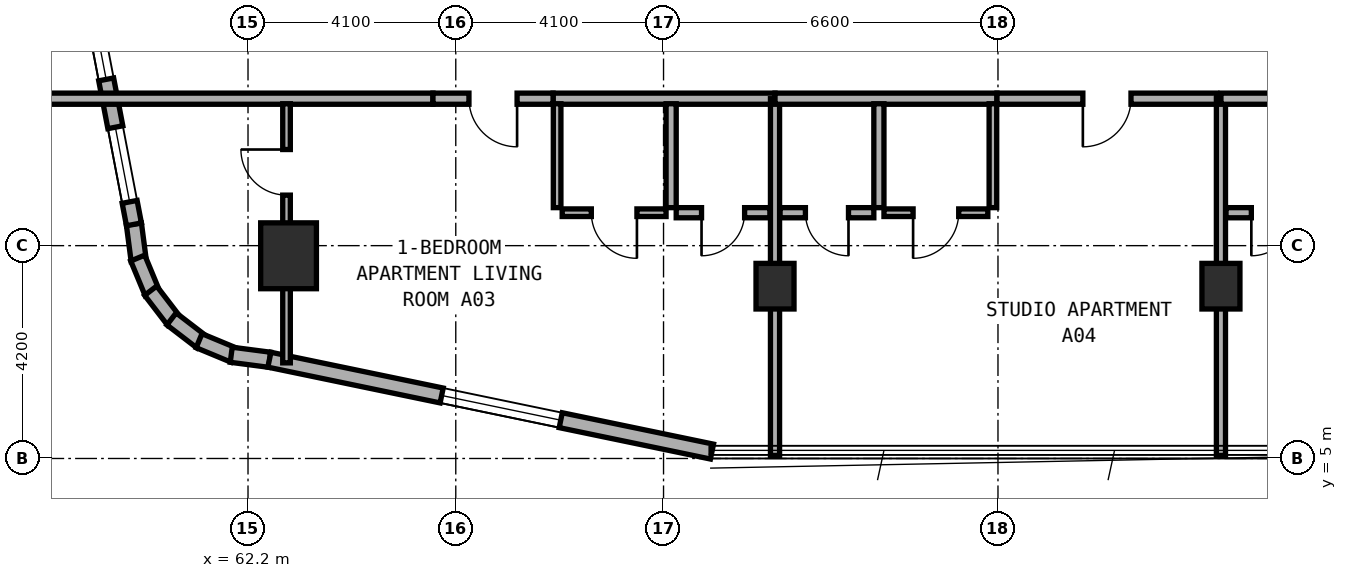
"""IFC4 building model, lengths in metres.
Left out: names, types, materials, properties, quantities, classifications, styles, units other than length and angle.
Written with IfcOpenShell. Run it as: python <this file> out.ifc"""

import sys

from ifc_helpers import new_model, si_unit, direction, frame, frame_2d, origin, origin_2d, place, context, subcontext, project, spatial, rectangle, extrude, element, fill, save


model = new_model("IFC4")
c1 = context("Model", 3, precision=1e-05, world=origin(), true_north=direction((0.0, 1.0)))
c2 = subcontext(c1, "Body", "Model", "MODEL_VIEW")
j1 = project(units=[si_unit("LENGTHUNIT", "METRE"), si_unit("PLANEANGLEUNIT", "RADIAN")], contexts=[c1])
p1 = place(None, origin())
s1 = spatial("IfcSite", under=j1, at=p1, CompositionType="ELEMENT")
p2 = place(p1, origin())
s2 = spatial("IfcBuilding", under=s1, at=p2, CompositionType="ELEMENT")
p3 = place(p2, frame((0.0, 0.0, 38.0)))
s3 = spatial("IfcBuildingStorey", under=s2, at=p3, CompositionType="ELEMENT", Elevation=38.0)
for number, where, z_axis, x_axis in (
    (1, (72.6, 8.4, 0.0), (0.0, 0.0, 1.0), (1.0, 0.0, 0.0)),
    (2, (81.4, 8.4, 0.0), (0.0, 0.0, 1.0), (1.0, 0.0, 0.0)),
):
    element("IfcColumn", number, at=place(p3, frame(where, z_axis=z_axis, x_axis=x_axis)), inside=s3, PredefinedType="COLUMN", context=c2, shape_type="SweptSolid", body=[
        extrude(rectangle(XDim=0.75, YDim=0.9, at=origin_2d()), origin(), (0.0, 0.0, 1.0), 3.5),
    ])
p4 = place(p3, frame((63.0, 9.0, 0.0), z_axis=(0.0, 0.0, 1.0), x_axis=(1.0, 0.0, 0.0)))
e3 = element("IfcColumn", 3, at=p4, inside=s3, PredefinedType="COLUMN", context=c2, shape_type="SweptSolid", body=[
    extrude(rectangle(XDim=1.1, YDim=1.3, at=origin_2d()), origin(), (0.0, 0.0, 1.0), 3.5),
])
p5 = place(p3, frame((59.948, 9.627, 0.0), z_axis=(0.0, 0.0, 1.0), x_axis=(0.130255288807, -0.991480488834, 0.0)))
e4 = element("IfcWall", 4, at=p5, inside=s3, PredefinedType="STANDARD", context=c2, shape_type="SweptSolid", body=[
    extrude(rectangle(XDim=0.729, YDim=0.3, at=frame_2d((0.365, 0.0))), origin(), (0.0, 0.0, 1.0), 3.25),
])
for number, where, z_axis, x_axis in (
    (5, (60.024, 8.955, 0.0), (0.0, 0.0, 1.0), (0.384, -0.924, 0.0)),
    (6, (60.279, 8.311, 0.0), (0.0, 0.0, 1.0), (0.608, -0.794, 0.0)),
    (7, (60.691, 7.754, 0.0), (0.0, 0.0, 1.0), (0.794, -0.608, 0.0)),
    (8, (61.234, 7.324, 0.0), (0.0, 0.0, 1.0), (0.924, -0.383, 0.0)),
):
    element("IfcWall", number, at=place(p3, frame(where, z_axis=z_axis, x_axis=x_axis)), inside=s3, PredefinedType="STANDARD", context=c2, shape_type="SweptSolid", body=[
        extrude(rectangle(XDim=0.746, YDim=0.3, at=frame_2d((0.373, 0.0))), origin(), (0.0, 0.0, 1.0), 3.25),
    ])
p6 = place(p3, frame((61.869, 7.047, 0.0), z_axis=(0.0, 0.0, 1.0), x_axis=(0.991559404866, -0.129653178221, 0.0)))
e9 = element("IfcWall", 9, at=p6, inside=s3, PredefinedType="STANDARD", context=c2, shape_type="SweptSolid", body=[
    extrude(rectangle(XDim=0.764, YDim=0.3, at=frame_2d((0.382, 0.0))), origin(), (0.0, 0.0, 1.0), 3.25),
])
p7 = place(p3, frame((62.622, 6.949, 0.0), z_axis=(0.0, 0.0, 1.0), x_axis=(0.979127260729, -0.203248142175, 0.0)))
e10 = element("IfcWall", 10, at=p7, inside=s3, PredefinedType="STANDARD", context=c2, shape_type="SweptSolid", body=[
    extrude(rectangle(XDim=8.92, YDim=0.3, at=frame_2d((4.46, 0.0))), origin(), (0.0, 0.0, 1.0), 3.25),
])
p8 = place(p7, frame((3.472, 0.0, 0.8)))
e11 = element("IfcOpeningElement", 11, at=p8, cuts=e10, PredefinedType="OPENING", context=c2, shape_type="SweptSolid", body=[
    extrude(rectangle(XDim=2.4, YDim=1.6, at=frame_2d((1.2, 0.8))), frame((0.0, 0.16, 0.0), z_axis=(0.0, -1.0, 0.0), x_axis=(1.0, 0.0, 0.0)), (0.0, 0.0, 1.0), 0.32),
])
p9 = place(p3, frame((58.137, 19.082, 0.0), z_axis=(0.0, 0.0, 1.0), x_axis=(0.188087874316, -0.982152203854, 0.0)))
e12 = element("IfcWall", 12, at=p9, inside=s3, PredefinedType="STANDARD", context=c2, shape_type="SweptSolid", body=[
    extrude(rectangle(XDim=9.634, YDim=0.3, at=frame_2d((4.817, 0.0))), origin(), (0.0, 0.0, 1.0), 3.25),
])
p10 = place(p9, frame((1.306, 0.0, 0.8)))
e13 = element("IfcOpeningElement", 13, at=p10, cuts=e12, PredefinedType="OPENING", context=c2, shape_type="SweptSolid", body=[
    extrude(rectangle(XDim=2.4, YDim=1.6, at=frame_2d((1.2, 0.8))), frame((0.0, 0.16, 0.0), z_axis=(0.0, -1.0, 0.0), x_axis=(1.0, 0.0, 0.0)), (0.0, 0.0, 1.0), 0.32),
])
p11 = place(p9, frame((5.521, 0.0, 0.85)))
e14 = element("IfcOpeningElement", 14, at=p11, cuts=e12, PredefinedType="OPENING", context=c2, shape_type="SweptSolid", body=[
    extrude(rectangle(XDim=1.2, YDim=1.5, at=frame_2d((0.6, 0.75))), frame((0.0, 0.16, 0.0), z_axis=(0.0, -1.0, 0.0), x_axis=(1.0, 0.0, 0.0)), (0.0, 0.0, 1.0), 0.32),
])
p12 = place(p9, frame((7.682, 0.0, 0.85)))
e15 = element("IfcOpeningElement", 15, at=p12, cuts=e12, PredefinedType="OPENING", context=c2, shape_type="SweptSolid", body=[
    extrude(rectangle(XDim=1.5, YDim=1.5, at=frame_2d((0.75, 0.75))), frame((0.0, 0.16, 0.0), z_axis=(0.0, -1.0, 0.0), x_axis=(1.0, 0.0, 0.0)), (0.0, 0.0, 1.0), 0.32),
])
p13 = place(p3, frame((58.16, 12.1, 0.0), z_axis=(0.0, 0.0, 1.0), x_axis=(1.0, 0.0, 0.0)))
e16 = element("IfcWall", 16, at=p13, inside=s3, PredefinedType="SOLIDWALL", context=c2, shape_type="SweptSolid", body=[
    extrude(rectangle(XDim=7.69, YDim=0.22, at=frame_2d((3.845, 0.0))), origin(), (0.0, 0.0, 1.0), 2.865),
])
p14 = place(p3, frame((68.22, 12.1, 0.0), z_axis=(0.0, 0.0, 1.0), x_axis=(1.0, 0.0, 0.0)))
e17 = element("IfcWall", 17, at=p14, inside=s3, PredefinedType="SOLIDWALL", context=c2, shape_type="SweptSolid", body=[
    extrude(rectangle(XDim=4.38, YDim=0.22, at=frame_2d((2.19, 0.0))), origin(), (0.0, 0.0, 1.0), 2.725),
])
p15 = place(p3, frame((65.85, 12.1, 0.0), z_axis=(0.0, 0.0, 1.0), x_axis=(1.0, 0.0, 0.0)))
e18 = element("IfcWall", 18, at=p15, inside=s3, PredefinedType="SOLIDWALL", context=c2, shape_type="SweptSolid", body=[
    extrude(rectangle(XDim=2.37, YDim=0.22, at=frame_2d((1.185, 0.0))), origin(), (0.0, 0.0, 1.0), 3.22),
])
p16 = place(p15, frame((0.71, 0.0, 0.0)))
e19 = element("IfcOpeningElement", 19, at=p16, cuts=e18, PredefinedType="OPENING", context=c2, shape_type="SweptSolid", body=[
    extrude(rectangle(XDim=0.95, YDim=2.1, at=frame_2d((0.475, 1.05))), frame((0.0, 0.12, 0.0), z_axis=(0.0, -1.0, 0.0), x_axis=(1.0, 0.0, 0.0)), (0.0, 0.0, 1.0), 0.24),
])
p17 = place(p3, frame((62.96, 6.887, 0.0), z_axis=(0.0, 0.0, 1.0), x_axis=(0.0, 1.0, 0.0)))
e20 = element("IfcWall", 20, at=p17, inside=s3, PredefinedType="PARTITIONING", context=c2, shape_type="SweptSolid", body=[
    extrude(rectangle(XDim=5.113, YDim=0.15, at=frame_2d((2.557, 0.0))), origin(), (0.0, 0.0, 1.0), 2.865),
])
p18 = place(p17, frame((3.31, 0.0, 0.0)))
e21 = element("IfcOpeningElement", 21, at=p18, cuts=e20, PredefinedType="OPENING", context=c2, shape_type="SweptSolid", body=[
    extrude(rectangle(XDim=0.9, YDim=2.1, at=frame_2d((0.45, 1.05))), frame((0.0, 0.085, 0.0), z_axis=(0.0, -1.0, 0.0), x_axis=(1.0, 0.0, 0.0)), (0.0, 0.0, 1.0), 0.17),
])
p19 = place(p3, frame((70.55, 9.95, 0.0), z_axis=(0.0, 0.0, 1.0), x_axis=(0.0, 1.0, 0.0)))
e22 = element("IfcWall", 22, at=p19, inside=s3, PredefinedType="PLUMBINGWALL", context=c2, shape_type="SweptSolid", body=[
    extrude(rectangle(XDim=2.05, YDim=0.2, at=frame_2d((1.025, 0.0))), origin(), (0.0, 0.0, 1.0), 3.22),
])
p20 = place(p3, frame((68.3, 9.95, 0.0), z_axis=(0.0, 0.0, 1.0), x_axis=(0.0, 1.0, 0.0)))
e23 = element("IfcWall", 23, at=p20, inside=s3, PredefinedType="PARTITIONING", context=c2, shape_type="SweptSolid", body=[
    extrude(rectangle(XDim=2.05, YDim=0.15, at=frame_2d((1.025, 0.0))), origin(), (0.0, 0.0, 1.0), 3.22),
])
p21 = place(p3, frame((70.65, 9.85, 0.0), z_axis=(0.0, 0.0, 1.0), x_axis=(1.0, 0.0, 0.0)))
e24 = element("IfcWall", 24, at=p21, inside=s3, PredefinedType="PLUMBINGWALL", context=c2, shape_type="SweptSolid", body=[
    extrude(rectangle(XDim=1.85, YDim=0.2, at=frame_2d((0.925, 0.0))), origin(), (0.0, 0.0, 1.0), 3.22),
])
p22 = place(p21, frame((0.5, 0.0, 0.0)))
e25 = element("IfcOpeningElement", 25, at=p22, cuts=e24, PredefinedType="OPENING", context=c2, shape_type="SweptSolid", body=[
    extrude(rectangle(XDim=0.85, YDim=2.1, at=frame_2d((0.425, 1.05))), frame((0.0, 0.11, 0.0), z_axis=(0.0, -1.0, 0.0), x_axis=(1.0, 0.0, 0.0)), (0.0, 0.0, 1.0), 0.22),
])
p23 = place(p3, frame((68.4, 9.85, 0.0), z_axis=(0.0, 0.0, 1.0), x_axis=(1.0, 0.0, 0.0)))
e26 = element("IfcWall", 26, at=p23, inside=s3, PredefinedType="PARTITIONING", context=c2, shape_type="SweptSolid", body=[
    extrude(rectangle(XDim=2.05, YDim=0.15, at=frame_2d((1.025, 0.0))), origin(), (0.0, 0.0, 1.0), 3.22),
])
p24 = place(p23, frame((0.575, 0.0, 0.0)))
e27 = element("IfcOpeningElement", 27, at=p24, cuts=e26, PredefinedType="OPENING", context=c2, shape_type="SweptSolid", body=[
    extrude(rectangle(XDim=0.9, YDim=2.1, at=frame_2d((0.45, 1.05))), frame((0.0, 0.085, 0.0), z_axis=(0.0, -1.0, 0.0), x_axis=(1.0, 0.0, 0.0)), (0.0, 0.0, 1.0), 0.17),
])
p25 = place(p3, frame((72.6, 5.06, 0.0), z_axis=(0.0, 0.0, 1.0), x_axis=(0.0, 1.0, 0.0)))
e28 = element("IfcWall", 28, at=p25, inside=s3, PredefinedType="SOLIDWALL", context=c2, shape_type="SweptSolid", body=[
    extrude(rectangle(XDim=7.04, YDim=0.18, at=frame_2d((3.52, 0.0))), origin(), (0.0, 0.0, 1.0), 2.725),
])
p26 = place(p3, frame((72.6, 12.1, 0.0), z_axis=(0.0, 0.0, 1.0), x_axis=(1.0, 0.0, 0.0)))
e29 = element("IfcWall", 29, at=p26, inside=s3, PredefinedType="SOLIDWALL", context=c2, shape_type="SweptSolid", body=[
    extrude(rectangle(XDim=4.38, YDim=0.22, at=frame_2d((2.19, 0.0))), origin(), (0.0, 0.0, 1.0), 2.725),
])
p27 = place(p3, frame((76.98, 12.1, 0.0), z_axis=(0.0, 0.0, 1.0), x_axis=(1.0, 0.0, 0.0)))
e30 = element("IfcWall", 30, at=p27, inside=s3, PredefinedType="SOLIDWALL", context=c2, shape_type="SweptSolid", body=[
    extrude(rectangle(XDim=4.34, YDim=0.22, at=frame_2d((2.17, 0.0))), origin(), (0.0, 0.0, 1.0), 2.725),
])
p28 = place(p27, frame((1.695, 0.0, 0.0)))
e31 = element("IfcOpeningElement", 31, at=p28, cuts=e30, PredefinedType="OPENING", context=c2, shape_type="SweptSolid", body=[
    extrude(rectangle(XDim=0.95, YDim=2.1, at=frame_2d((0.475, 1.05))), frame((0.0, 0.12, 0.0), z_axis=(0.0, -1.0, 0.0), x_axis=(1.0, 0.0, 0.0)), (0.0, 0.0, 1.0), 0.24),
])
p29 = place(p3, frame((74.65, 9.95, 0.0), z_axis=(0.0, 0.0, 1.0), x_axis=(0.0, 1.0, 0.0)))
e32 = element("IfcWall", 32, at=p29, inside=s3, PredefinedType="PLUMBINGWALL", context=c2, shape_type="SweptSolid", body=[
    extrude(rectangle(XDim=2.05, YDim=0.2, at=frame_2d((1.025, 0.0))), origin(), (0.0, 0.0, 1.0), 2.895),
])
p30 = place(p3, frame((76.9, 9.95, 0.0), z_axis=(0.0, 0.0, 1.0), x_axis=(0.0, 1.0, 0.0)))
e33 = element("IfcWall", 33, at=p30, inside=s3, PredefinedType="PARTITIONING", context=c2, shape_type="SweptSolid", body=[
    extrude(rectangle(XDim=2.05, YDim=0.15, at=frame_2d((1.025, 0.0))), origin(), (0.0, 0.0, 1.0), 2.895),
])
p31 = place(p3, frame((72.7, 9.85, 0.0), z_axis=(0.0, 0.0, 1.0), x_axis=(1.0, 0.0, 0.0)))
e34 = element("IfcWall", 34, at=p31, inside=s3, PredefinedType="PLUMBINGWALL", context=c2, shape_type="SweptSolid", body=[
    extrude(rectangle(XDim=1.85, YDim=0.2, at=frame_2d((0.925, 0.0))), origin(), (0.0, 0.0, 1.0), 3.22),
])
p32 = place(p31, frame((0.5, 0.0, 0.0)))
e35 = element("IfcOpeningElement", 35, at=p32, cuts=e34, PredefinedType="OPENING", context=c2, shape_type="SweptSolid", body=[
    extrude(rectangle(XDim=0.85, YDim=2.1, at=frame_2d((0.425, 1.05))), frame((0.0, 0.11, 0.0), z_axis=(0.0, -1.0, 0.0), x_axis=(1.0, 0.0, 0.0)), (0.0, 0.0, 1.0), 0.22),
])
p33 = place(p3, frame((74.75, 9.85, 0.0), z_axis=(0.0, 0.0, 1.0), x_axis=(1.0, 0.0, 0.0)))
e36 = element("IfcWall", 36, at=p33, inside=s3, PredefinedType="PARTITIONING", context=c2, shape_type="SweptSolid", body=[
    extrude(rectangle(XDim=2.05, YDim=0.15, at=frame_2d((1.025, 0.0))), origin(), (0.0, 0.0, 1.0), 3.22),
])
p34 = place(p33, frame((0.575, 0.0, 0.0)))
e37 = element("IfcOpeningElement", 37, at=p34, cuts=e36, PredefinedType="OPENING", context=c2, shape_type="SweptSolid", body=[
    extrude(rectangle(XDim=0.9, YDim=2.1, at=frame_2d((0.45, 1.05))), frame((0.0, 0.085, 0.0), z_axis=(0.0, -1.0, 0.0), x_axis=(1.0, 0.0, 0.0)), (0.0, 0.0, 1.0), 0.17),
])
p35 = place(p3, frame((81.4, 5.06, 0.0), z_axis=(0.0, 0.0, 1.0), x_axis=(0.0, 1.0, 0.0)))
e38 = element("IfcWall", 38, at=p35, inside=s3, PredefinedType="SOLIDWALL", context=c2, shape_type="SweptSolid", body=[
    extrude(rectangle(XDim=7.04, YDim=0.18, at=frame_2d((3.52, 0.0))), origin(), (0.0, 0.0, 1.0), 2.725),
])
p36 = place(p3, frame((81.4, 12.1, 0.0), z_axis=(0.0, 0.0, 1.0), x_axis=(1.0, 0.0, 0.0)))
e39 = element("IfcWall", 39, at=p36, inside=s3, PredefinedType="SOLIDWALL", context=c2, shape_type="SweptSolid", body=[
    extrude(rectangle(XDim=4.38, YDim=0.22, at=frame_2d((2.19, 0.0))), origin(), (0.0, 0.0, 1.0), 2.725),
])
p37 = place(p3, frame((81.5, 9.85, 0.0), z_axis=(0.0, 0.0, 1.0), x_axis=(1.0, 0.0, 0.0)))
e40 = element("IfcWall", 40, at=p37, inside=s3, PredefinedType="PLUMBINGWALL", context=c2, shape_type="SweptSolid", body=[
    extrude(rectangle(XDim=1.85, YDim=0.2, at=frame_2d((0.925, 0.0))), origin(), (0.0, 0.0, 1.0), 2.725),
])
p38 = place(p37, frame((0.5, 0.0, 0.0)))
e41 = element("IfcOpeningElement", 41, at=p38, cuts=e40, PredefinedType="OPENING", context=c2, shape_type="SweptSolid", body=[
    extrude(rectangle(XDim=0.85, YDim=2.1, at=frame_2d((0.425, 1.05))), frame((0.0, 0.11, 0.0), z_axis=(0.0, -1.0, 0.0), x_axis=(1.0, 0.0, 0.0)), (0.0, 0.0, 1.0), 0.22),
])
p39 = place(p8, origin())
e42 = element("IfcWindow", 42, at=p39, inside=s3, PartitioningType="SINGLE_PANEL", PredefinedType="WINDOW", context=c2, shape_type="SweptSolid", body=[
    extrude(rectangle(XDim=2.4, YDim=1.6, at=frame_2d((1.2, 0.8))), frame((0.0, 0.03, 0.0), z_axis=(0.0, -1.0, 0.0), x_axis=(1.0, 0.0, 0.0)), (0.0, 0.0, 1.0), 0.06),
])
fill(e11, e42)
p40 = place(p11, origin())
e43 = element("IfcWindow", 43, at=p40, inside=s3, PartitioningType="SINGLE_PANEL", PredefinedType="WINDOW", context=c2, shape_type="SweptSolid", body=[
    extrude(rectangle(XDim=1.2, YDim=1.5, at=frame_2d((0.6, 0.75))), frame((0.0, 0.03, 0.0), z_axis=(0.0, -1.0, 0.0), x_axis=(1.0, 0.0, 0.0)), (0.0, 0.0, 1.0), 0.06),
])
fill(e14, e43)
p41 = place(p12, origin())
e44 = element("IfcWindow", 44, at=p41, inside=s3, PartitioningType="SINGLE_PANEL", PredefinedType="WINDOW", context=c2, shape_type="SweptSolid", body=[
    extrude(rectangle(XDim=1.5, YDim=1.5, at=frame_2d((0.75, 0.75))), frame((0.0, 0.03, 0.0), z_axis=(0.0, -1.0, 0.0), x_axis=(1.0, 0.0, 0.0)), (0.0, 0.0, 1.0), 0.06),
])
fill(e15, e44)
p42 = place(p16, frame((0.95, 0.0, 0.0), z_axis=(0.0, 0.0, 1.0), x_axis=(-1.0, 0.0, 0.0)))
e45 = element("IfcDoor", 45, at=p42, inside=s3, OperationType="SINGLE_SWING_LEFT", PredefinedType="DOOR", context=c2, shape_type="SweptSolid", body=[
    extrude(rectangle(XDim=0.95, YDim=2.1, at=frame_2d((0.475, 1.05))), frame((0.0, 0.025, 0.0), z_axis=(0.0, -1.0, 0.0), x_axis=(1.0, 0.0, 0.0)), (0.0, 0.0, 1.0), 0.05),
])
fill(e19, e45)
p43 = place(p18, origin())
e46 = element("IfcDoor", 46, at=p43, inside=s3, OperationType="SINGLE_SWING_RIGHT", PredefinedType="DOOR", context=c2, shape_type="SweptSolid", body=[
    extrude(rectangle(XDim=0.9, YDim=2.1, at=frame_2d((0.45, 1.05))), frame((0.0, 0.025, 0.0), z_axis=(0.0, -1.0, 0.0), x_axis=(1.0, 0.0, 0.0)), (0.0, 0.0, 1.0), 0.05),
])
fill(e21, e46)
p44 = place(p22, frame((0.85, 0.0, 0.0), z_axis=(0.0, 0.0, 1.0), x_axis=(-1.0, 0.0, 0.0)))
e47 = element("IfcDoor", 47, at=p44, inside=s3, OperationType="SINGLE_SWING_RIGHT", PredefinedType="DOOR", context=c2, shape_type="SweptSolid", body=[
    extrude(rectangle(XDim=0.85, YDim=2.1, at=frame_2d((0.425, 1.05))), frame((0.0, 0.025, 0.0), z_axis=(0.0, -1.0, 0.0), x_axis=(1.0, 0.0, 0.0)), (0.0, 0.0, 1.0), 0.05),
])
fill(e25, e47)
p45 = place(p24, frame((0.9, 0.0, 0.0), z_axis=(0.0, 0.0, 1.0), x_axis=(-1.0, 0.0, 0.0)))
e48 = element("IfcDoor", 48, at=p45, inside=s3, OperationType="SINGLE_SWING_LEFT", PredefinedType="DOOR", context=c2, shape_type="SweptSolid", body=[
    extrude(rectangle(XDim=0.9, YDim=2.1, at=frame_2d((0.45, 1.05))), frame((0.0, 0.025, 0.0), z_axis=(0.0, -1.0, 0.0), x_axis=(1.0, 0.0, 0.0)), (0.0, 0.0, 1.0), 0.05),
])
fill(e27, e48)
p46 = place(p28, frame((0.95, 0.0, 0.0), z_axis=(0.0, 0.0, 1.0), x_axis=(-1.0, 0.0, 0.0)))
e49 = element("IfcDoor", 49, at=p46, inside=s3, OperationType="SINGLE_SWING_RIGHT", PredefinedType="DOOR", context=c2, shape_type="SweptSolid", body=[
    extrude(rectangle(XDim=0.95, YDim=2.1, at=frame_2d((0.475, 1.05))), frame((0.0, 0.025, 0.0), z_axis=(0.0, -1.0, 0.0), x_axis=(1.0, 0.0, 0.0)), (0.0, 0.0, 1.0), 0.05),
])
fill(e31, e49)
p47 = place(p32, frame((0.85, 0.0, 0.0), z_axis=(0.0, 0.0, 1.0), x_axis=(-1.0, 0.0, 0.0)))
e50 = element("IfcDoor", 50, at=p47, inside=s3, OperationType="SINGLE_SWING_LEFT", PredefinedType="DOOR", context=c2, shape_type="SweptSolid", body=[
    extrude(rectangle(XDim=0.85, YDim=2.1, at=frame_2d((0.425, 1.05))), frame((0.0, 0.025, 0.0), z_axis=(0.0, -1.0, 0.0), x_axis=(1.0, 0.0, 0.0)), (0.0, 0.0, 1.0), 0.05),
])
fill(e35, e50)
p48 = place(p34, frame((0.9, 0.0, 0.0), z_axis=(0.0, 0.0, 1.0), x_axis=(-1.0, 0.0, 0.0)))
e51 = element("IfcDoor", 51, at=p48, inside=s3, OperationType="SINGLE_SWING_RIGHT", PredefinedType="DOOR", context=c2, shape_type="SweptSolid", body=[
    extrude(rectangle(XDim=0.9, YDim=2.1, at=frame_2d((0.45, 1.05))), frame((0.0, 0.025, 0.0), z_axis=(0.0, -1.0, 0.0), x_axis=(1.0, 0.0, 0.0)), (0.0, 0.0, 1.0), 0.05),
])
fill(e37, e51)
p49 = place(p38, frame((0.85, 0.0, 0.0), z_axis=(0.0, 0.0, 1.0), x_axis=(-1.0, 0.0, 0.0)))
e52 = element("IfcDoor", 52, at=p49, inside=s3, OperationType="SINGLE_SWING_RIGHT", PredefinedType="DOOR", context=c2, shape_type="SweptSolid", body=[
    extrude(rectangle(XDim=0.85, YDim=2.1, at=frame_2d((0.425, 1.05))), frame((0.0, 0.025, 0.0), z_axis=(0.0, -1.0, 0.0), x_axis=(1.0, 0.0, 0.0)), (0.0, 0.0, 1.0), 0.05),
])
fill(e41, e52)
save(model, sys.argv[1])
